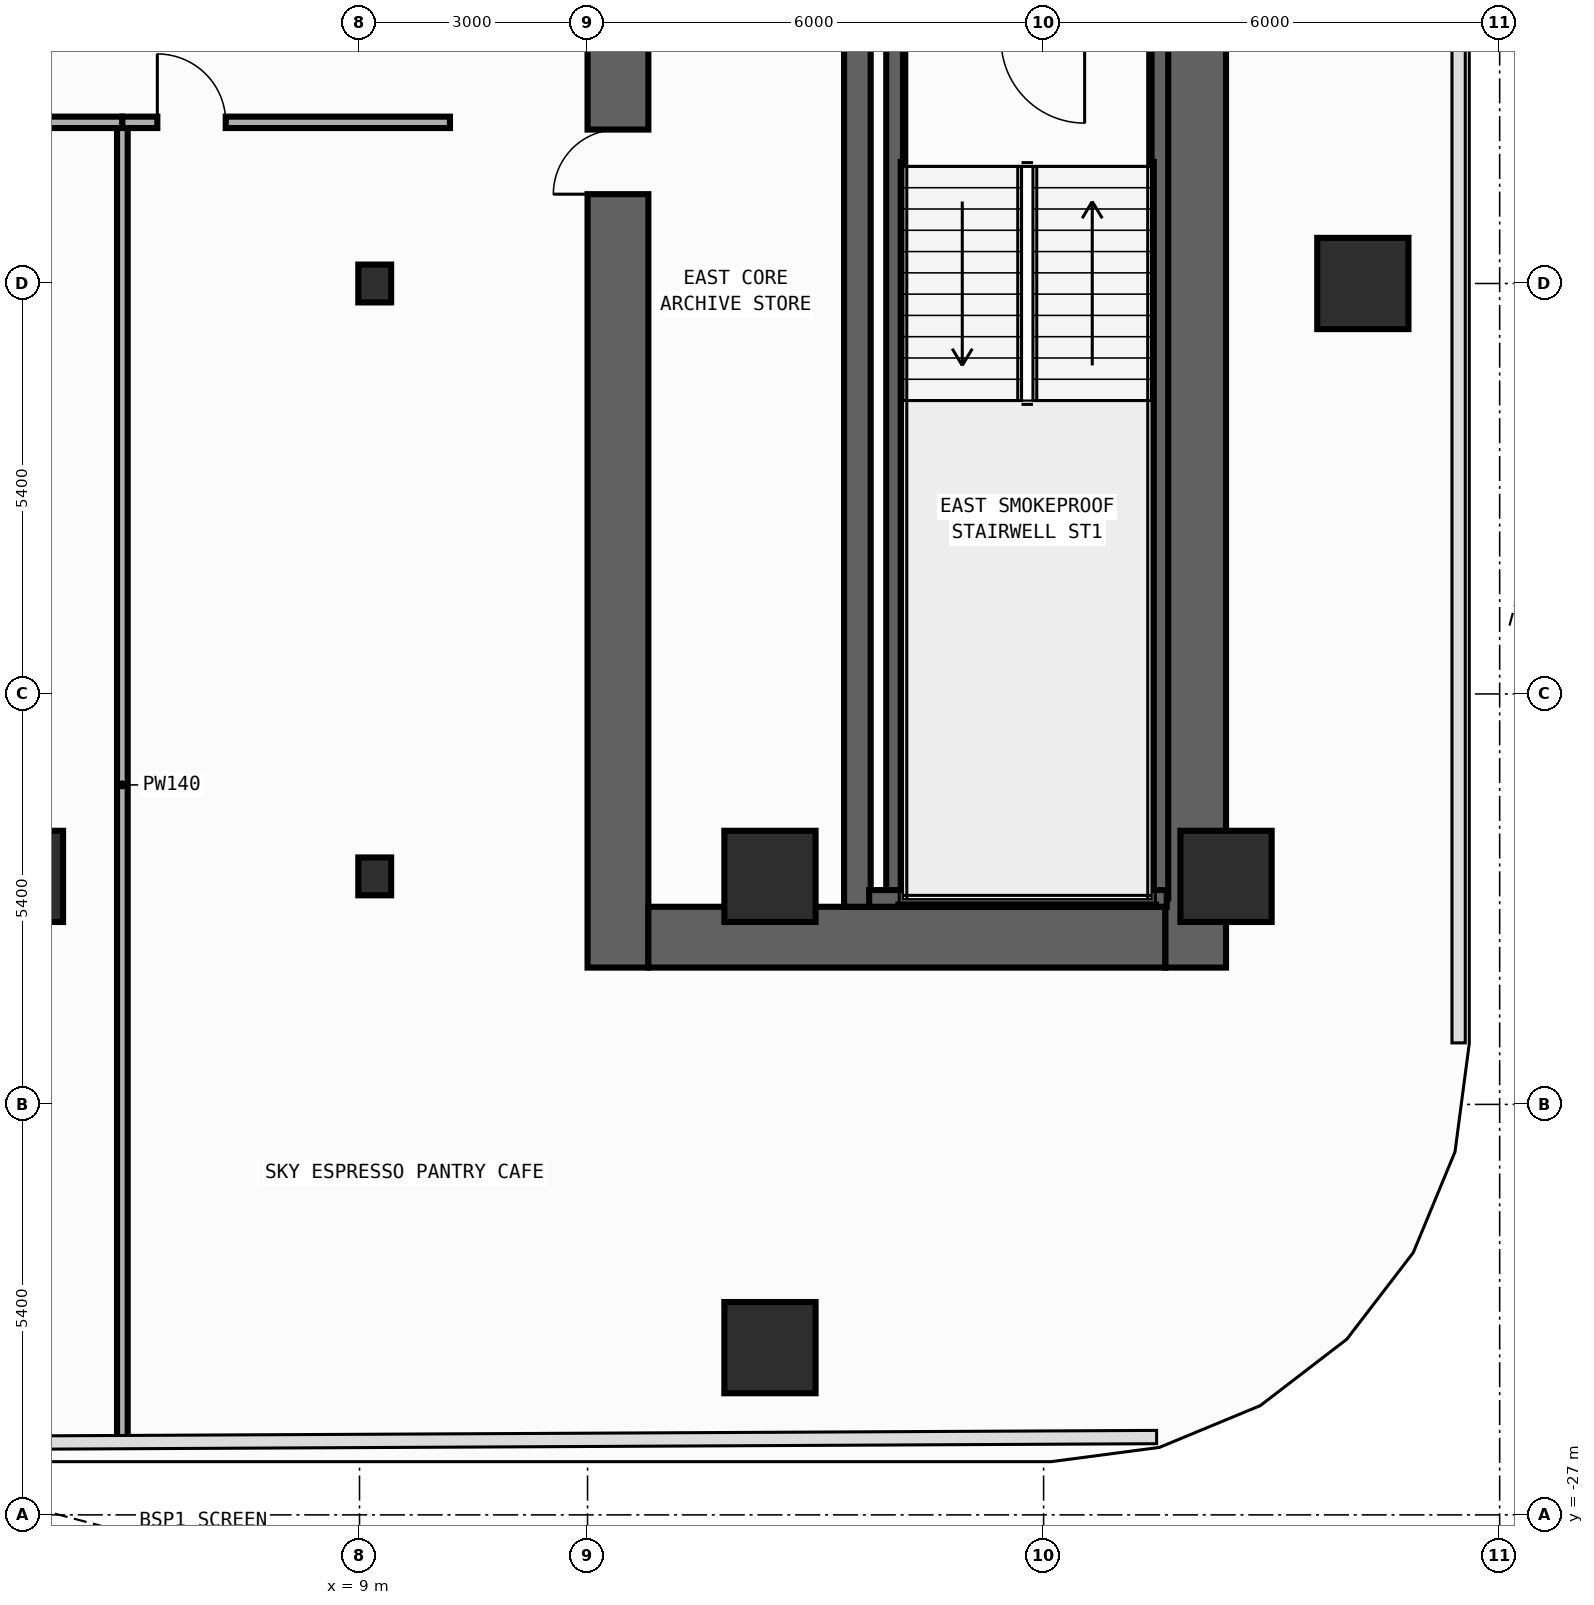
"""IFC4 building model, lengths in metres.
Left out: names, types, materials, properties, quantities, classifications, styles, units other than length and angle.
Written with IfcOpenShell. Run it as: python <this file> out.ifc"""

import sys

from ifc_helpers import new_model, si_unit, direction, frame, frame_2d, origin, origin_2d, place, context, subcontext, project, spatial, rectangle, i_section, extrude, element, fill, save


model = new_model("IFC4")
c1 = context("Model", 3, precision=1e-05, world=origin(), true_north=direction((0.0, 1.0)))
c2 = subcontext(c1, "Body", "Model", "MODEL_VIEW")
j1 = project(units=[si_unit("LENGTHUNIT", "METRE"), si_unit("PLANEANGLEUNIT", "RADIAN")], contexts=[c1])
p1 = place(None, origin())
s1 = spatial("IfcSite", under=j1, at=p1, CompositionType="ELEMENT")
p2 = place(p1, origin())
s2 = spatial("IfcBuilding", under=s1, at=p2, CompositionType="ELEMENT")
p3 = place(p2, frame((0.0, 0.0, 93.2)))
s3 = spatial("IfcBuildingStorey", under=s2, at=p3, CompositionType="ELEMENT", Elevation=93.2)
p4 = place(p3, frame((12.4, -19.8, 0.0), z_axis=(0.0, 0.0, 1.0), x_axis=(0.0, 1.0, 0.0)))
e1 = element("IfcWall", 1, at=p4, inside=s3, PredefinedType="SHEAR", context=c2, shape_type="SweptSolid", body=[
    extrude(rectangle(XDim=27.0, YDim=0.8, at=frame_2d((13.5, 0.0))), origin(), (0.0, 0.0, 1.0), 3.94),
])
p5 = place(p4, frame((23.05, 0.0, 0.0)))
e2 = element("IfcOpeningElement", 2, at=p5, cuts=e1, PredefinedType="OPENING", context=c2, shape_type="SweptSolid", body=[
    extrude(rectangle(XDim=1.1, YDim=2.2, at=frame_2d((0.55, 1.1))), frame((0.0, 0.41, 0.0), z_axis=(0.0, -1.0, 0.0), x_axis=(1.0, 0.0, 0.0)), (0.0, 0.0, 1.0), 0.82),
])
p6 = place(p4, frame((19.85, 0.0, 0.0)))
e3 = element("IfcOpeningElement", 3, at=p6, cuts=e1, PredefinedType="OPENING", context=c2, shape_type="SweptSolid", body=[
    extrude(rectangle(XDim=1.1, YDim=2.2, at=frame_2d((0.55, 1.1))), frame((0.0, 0.41, 0.0), z_axis=(0.0, -1.0, 0.0), x_axis=(1.0, 0.0, 0.0)), (0.0, 0.0, 1.0), 0.82),
])
p7 = place(p4, frame((16.65, 0.0, 0.0)))
e4 = element("IfcOpeningElement", 4, at=p7, cuts=e1, PredefinedType="OPENING", context=c2, shape_type="SweptSolid", body=[
    extrude(rectangle(XDim=1.1, YDim=2.2, at=frame_2d((0.55, 1.1))), frame((0.0, 0.41, 0.0), z_axis=(0.0, -1.0, 0.0), x_axis=(1.0, 0.0, 0.0)), (0.0, 0.0, 1.0), 0.82),
])
p8 = place(p4, frame((10.175, 0.0, 0.0)))
e5 = element("IfcOpeningElement", 5, at=p8, cuts=e1, PredefinedType="OPENING", context=c2, shape_type="SweptSolid", body=[
    extrude(rectangle(XDim=0.85, YDim=2.1, at=frame_2d((0.425, 1.05))), frame((0.0, 0.41, 0.0), z_axis=(0.0, -1.0, 0.0), x_axis=(1.0, 0.0, 0.0)), (0.0, 0.0, 1.0), 0.82),
])
p9 = place(p4, frame((12.725, 0.0, 0.0)))
e6 = element("IfcOpeningElement", 6, at=p9, cuts=e1, PredefinedType="OPENING", context=c2, shape_type="SweptSolid", body=[
    extrude(rectangle(XDim=1.15, YDim=2.2, at=frame_2d((0.575, 1.1))), frame((0.0, 0.41, 0.0), z_axis=(0.0, -1.0, 0.0), x_axis=(1.0, 0.0, 0.0)), (0.0, 0.0, 1.0), 0.82),
])
p10 = place(p4, frame((25.125, 0.0, 0.0)))
e7 = element("IfcOpeningElement", 7, at=p10, cuts=e1, PredefinedType="OPENING", context=c2, shape_type="SweptSolid", body=[
    extrude(rectangle(XDim=0.85, YDim=2.1, at=frame_2d((0.425, 1.05))), frame((0.0, 0.41, 0.0), z_axis=(0.0, -1.0, 0.0), x_axis=(1.0, 0.0, 0.0)), (0.0, 0.0, 1.0), 0.82),
])
p11 = place(p3, frame((20.0, -19.8, 0.0), z_axis=(0.0, 0.0, 1.0), x_axis=(0.0, 1.0, 0.0)))
e8 = element("IfcWall", 8, at=p11, inside=s3, PredefinedType="SHEAR", context=c2, shape_type="SweptSolid", body=[
    extrude(rectangle(XDim=27.0, YDim=0.8, at=frame_2d((13.5, 0.0))), origin(), (0.0, 0.0, 1.0), 3.94),
])
p12 = place(p3, frame((12.8, -19.4, 0.0), z_axis=(0.0, 0.0, 1.0), x_axis=(1.0, 0.0, 0.0)))
e9 = element("IfcWall", 9, at=p12, inside=s3, PredefinedType="SHEAR", context=c2, shape_type="SweptSolid", body=[
    extrude(rectangle(XDim=6.8, YDim=0.8, at=frame_2d((3.4, 0.0))), origin(), (0.0, 0.0, 1.0), 3.94),
])
p13 = place(p3, frame((15.55, -19.0, 0.0), z_axis=(0.0, 0.0, 1.0), x_axis=(0.0, 1.0, 0.0)))
e10 = element("IfcWall", 10, at=p13, inside=s3, PredefinedType="SHEAR", context=c2, shape_type="SweptSolid", body=[
    extrude(rectangle(XDim=25.4, YDim=0.35, at=frame_2d((12.7, 0.0))), origin(), (0.0, 0.0, 1.0), 3.94),
])
p14 = place(p13, frame((11.925, 0.0, 0.0)))
e11 = element("IfcOpeningElement", 11, at=p14, cuts=e10, PredefinedType="OPENING", context=c2, shape_type="SweptSolid", body=[
    extrude(rectangle(XDim=1.15, YDim=2.2, at=frame_2d((0.575, 1.1))), frame((0.0, 0.185, 0.0), z_axis=(0.0, -1.0, 0.0), x_axis=(1.0, 0.0, 0.0)), (0.0, 0.0, 1.0), 0.37),
])
p15 = place(p13, frame((24.325, 0.0, 0.0)))
e12 = element("IfcOpeningElement", 12, at=p15, cuts=e10, PredefinedType="OPENING", context=c2, shape_type="SweptSolid", body=[
    extrude(rectangle(XDim=0.85, YDim=2.1, at=frame_2d((0.425, 1.05))), frame((0.0, 0.185, 0.0), z_axis=(0.0, -1.0, 0.0), x_axis=(1.0, 0.0, 0.0)), (0.0, 0.0, 1.0), 0.37),
])
for number, where, z_axis, x_axis in (
    (13, (16.04, -18.89, 0.0), (0.0, 0.0, 1.0), (0.0, 1.0, 0.0)),
    (14, (19.53, -18.89, 0.0), (0.0, 0.0, 1.0), (0.0, 1.0, 0.0)),
):
    element("IfcWall", number, at=place(p3, frame(where, z_axis=z_axis, x_axis=x_axis)), inside=s3, PredefinedType="SHEAR", context=c2, shape_type="SweptSolid", body=[
        extrude(rectangle(XDim=11.3, YDim=0.22, at=frame_2d((5.65, 0.0))), origin(), (0.0, 0.0, 1.0), 3.94),
    ])
p16 = place(p3, frame((15.705, -18.89, 0.0), z_axis=(0.0, 0.0, 1.0), x_axis=(1.0, 0.0, 0.0)))
e15 = element("IfcWall", 15, at=p16, inside=s3, PredefinedType="SHEAR", context=c2, shape_type="SweptSolid", body=[
    extrude(rectangle(XDim=3.915, YDim=0.22, at=frame_2d((1.958, 0.0))), origin(), (0.0, 0.0, 1.0), 3.94),
])
for number, where, z_axis, x_axis in (
    (16, (9.2, -18.6, 0.0), (0.0, 0.0, 1.0), (1.0, 0.0, 0.0)),
    (17, (9.2, -10.8, 0.0), (0.0, 0.0, 1.0), (1.0, 0.0, 0.0)),
):
    element("IfcColumn", number, at=place(p3, frame(where, z_axis=z_axis, x_axis=x_axis)), inside=s3, PredefinedType="COLUMN", context=c2, shape_type="SweptSolid", body=[
        extrude(i_section(OverallWidth=0.432, OverallDepth=0.498, WebThickness=0.045, FlangeThickness=0.07, FilletRadius=0.022, at=origin_2d()), origin(), (0.0, 0.0, 1.0), 4.2),
    ])
for number, where, z_axis, x_axis in (
    (18, (20.4, -18.6, 0.0), (0.0, 0.0, 1.0), (1.0, 0.0, 0.0)),
    (19, (14.4, -18.6, 0.0), (0.0, 0.0, 1.0), (1.0, 0.0, 0.0)),
    (20, (4.5, -18.6, 0.0), (0.0, 0.0, 1.0), (1.0, 0.0, 0.0)),
    (21, (22.2, -10.8, 0.0), (0.0, 0.0, 1.0), (1.0, 0.0, 0.0)),
    (22, (14.4, -24.8, 0.0), (0.0, 0.0, 1.0), (1.0, 0.0, 0.0)),
):
    element("IfcColumn", number, at=place(p3, frame(where, z_axis=z_axis, x_axis=x_axis)), inside=s3, PredefinedType="COLUMN", context=c2, shape_type="SweptSolid", body=[
        extrude(rectangle(XDim=1.2, YDim=1.2, at=origin_2d()), origin(), (0.0, 0.0, 1.0), 4.2),
    ])
p17 = place(p3, frame((-9.36, -8.68, 0.0), z_axis=(0.0, 0.0, 1.0), x_axis=(1.0, 0.0, 0.0)))
e23 = element("IfcWall", 23, at=p17, inside=s3, PredefinedType="PARTITIONING", context=c2, shape_type="SweptSolid", body=[
    extrude(rectangle(XDim=15.24, YDim=0.15, at=frame_2d((7.62, 0.0))), origin(), (0.0, 0.0, 1.0), 3.94),
])
p18 = place(p17, frame((8.873, 0.0, 0.0)))
e24 = element("IfcOpeningElement", 24, at=p18, cuts=e23, PredefinedType="OPENING", context=c2, shape_type="SweptSolid", body=[
    extrude(rectangle(XDim=0.9, YDim=2.15, at=frame_2d((0.45, 1.075))), frame((0.0, 0.085, 0.0), z_axis=(0.0, -1.0, 0.0), x_axis=(1.0, 0.0, 0.0)), (0.0, 0.0, 1.0), 0.17),
])
p19 = place(p3, frame((5.88, -8.68, 0.0), z_axis=(0.0, 0.0, 1.0), x_axis=(1.0, 0.0, 0.0)))
e25 = element("IfcWall", 25, at=p19, inside=s3, PredefinedType="PARTITIONING", context=c2, shape_type="SweptSolid", body=[
    extrude(rectangle(XDim=4.31, YDim=0.15, at=frame_2d((2.155, 0.0))), origin(), (0.0, 0.0, 1.0), 3.94),
])
p20 = place(p19, frame((0.46, 0.0, 0.0)))
e26 = element("IfcOpeningElement", 26, at=p20, cuts=e25, PredefinedType="OPENING", context=c2, shape_type="SweptSolid", body=[
    extrude(rectangle(XDim=0.9, YDim=2.15, at=frame_2d((0.45, 1.075))), frame((0.0, 0.085, 0.0), z_axis=(0.0, -1.0, 0.0), x_axis=(1.0, 0.0, 0.0)), (0.0, 0.0, 1.0), 0.17),
])
p21 = place(p3, frame((5.88, -26.038, 0.0), z_axis=(0.0, 0.0, 1.0), x_axis=(0.0, 1.0, 0.0)))
e27 = element("IfcWall", 27, at=p21, inside=s3, PredefinedType="PARTITIONING", context=c2, shape_type="SweptSolid", body=[
    extrude(rectangle(XDim=17.283, YDim=0.14, at=frame_2d((8.642, 0.0))), origin(), (0.0, 0.0, 1.0), 3.94),
])
p22 = place(p8, origin())
e28 = element("IfcDoor", 28, at=p22, inside=s3, OperationType="SINGLE_SWING_LEFT", PredefinedType="DOOR", context=c2, shape_type="SweptSolid", body=[
    extrude(rectangle(XDim=0.85, YDim=2.1, at=frame_2d((0.425, 1.05))), frame((0.0, 0.025, 0.0), z_axis=(0.0, -1.0, 0.0), x_axis=(1.0, 0.0, 0.0)), (0.0, 0.0, 1.0), 0.05),
])
fill(e5, e28)
p23 = place(p20, origin())
e29 = element("IfcDoor", 29, at=p23, inside=s3, OperationType="SINGLE_SWING_LEFT", PredefinedType="DOOR", context=c2, shape_type="SweptSolid", body=[
    extrude(rectangle(XDim=0.9, YDim=2.15, at=frame_2d((0.45, 1.075))), frame((0.0, 0.025, 0.0), z_axis=(0.0, -1.0, 0.0), x_axis=(1.0, 0.0, 0.0)), (0.0, 0.0, 1.0), 0.05),
])
fill(e26, e29)
save(model, sys.argv[1])
